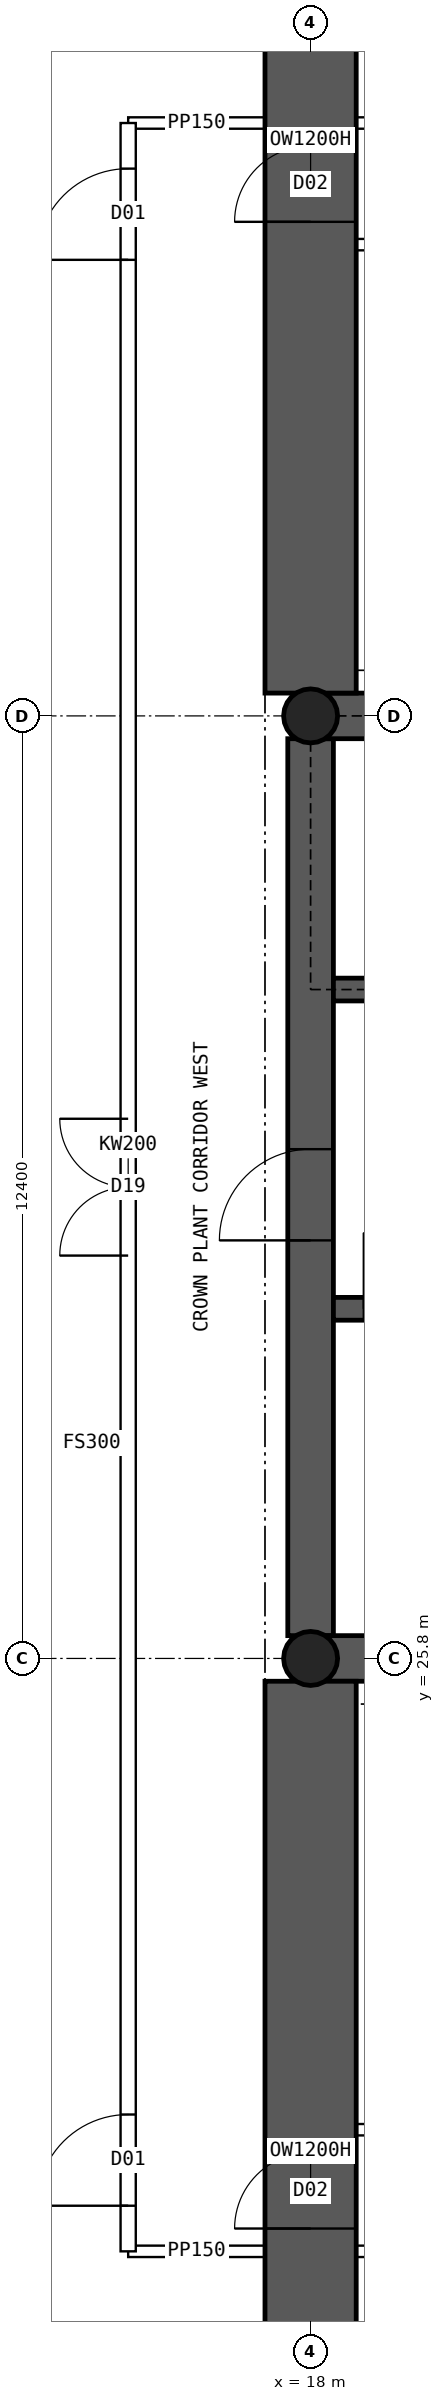
"""IFC4 building model, lengths in metres.
Left out: names, types, materials, properties, quantities, classifications, styles, units other than length and angle.
Written with IfcOpenShell. Run it as: python <this file> out.ifc"""

import sys

from ifc_helpers import new_model, si_unit, direction, frame, frame_2d, origin, origin_2d, place, context, subcontext, project, spatial, rectangle, hollow_circle, extrude, element, fill, save


model = new_model("IFC4")
c1 = context("Model", 3, precision=1e-05, world=origin(), true_north=direction((0.0, 1.0)))
c2 = subcontext(c1, "Body", "Model", "MODEL_VIEW")
j1 = project(units=[si_unit("LENGTHUNIT", "METRE"), si_unit("PLANEANGLEUNIT", "RADIAN")], contexts=[c1])
p1 = place(None, origin())
s1 = spatial("IfcSite", under=j1, at=p1, CompositionType="ELEMENT")
p2 = place(p1, origin())
s2 = spatial("IfcBuilding", under=s1, at=p2, CompositionType="ELEMENT")
p3 = place(p2, frame((0.0, 0.0, 262.3)))
s3 = spatial("IfcBuildingStorey", under=s2, at=p3, CompositionType="ELEMENT", Elevation=262.3)
for number, where, z_axis, x_axis in (
    (1, (18.0, 25.8, 0.0), (0.0, 0.0, 1.0), (1.0, 0.0, 0.0)),
    (2, (18.0, 38.2, 0.0), (0.0, 0.0, 1.0), (1.0, 0.0, 0.0)),
):
    element("IfcWall", number, at=place(p3, frame(where, z_axis=z_axis, x_axis=x_axis)), inside=s3, PredefinedType="SHEAR", context=c2, shape_type="SweptSolid", body=[
        extrude(rectangle(XDim=48.0, YDim=0.6, at=frame_2d((24.0, 0.0))), origin(), (0.0, 0.0, 1.0), 6.0),
    ])
p4 = place(p3, frame((18.0, 26.1, 0.0), z_axis=(0.0, 0.0, 1.0), x_axis=(0.0, 1.0, 0.0)))
e3 = element("IfcWall", 3, at=p4, inside=s3, PredefinedType="SHEAR", context=c2, shape_type="SweptSolid", body=[
    extrude(rectangle(XDim=11.8, YDim=0.6, at=frame_2d((5.9, 0.0))), origin(), (0.0, 0.0, 1.0), 6.0),
])
p5 = place(p4, frame((5.2, 0.0, 0.0)))
e4 = element("IfcOpeningElement", 4, at=p5, cuts=e3, PredefinedType="OPENING", context=c2, shape_type="SweptSolid", body=[
    extrude(rectangle(XDim=1.2, YDim=2.1, at=frame_2d((0.6, 1.05))), frame((0.0, 0.31, 0.0), z_axis=(0.0, -1.0, 0.0), x_axis=(1.0, 0.0, 0.0)), (0.0, 0.0, 1.0), 0.62),
])
p6 = place(p3, frame((18.3, 30.4, 0.0), z_axis=(0.0, 0.0, 1.0), x_axis=(1.0, 0.0, 0.0)))
e5 = element("IfcWall", 5, at=p6, inside=s3, PredefinedType="SHEAR", context=c2, shape_type="SweptSolid", body=[
    extrude(rectangle(XDim=47.4, YDim=0.3, at=frame_2d((23.7, 0.0))), origin(), (0.0, 0.0, 1.0), 6.0),
])
p7 = place(p6, frame((0.4, 0.0, 0.0)))
e6 = element("IfcOpeningElement", 6, at=p7, cuts=e5, PredefinedType="OPENING", context=c2, shape_type="SweptSolid", body=[
    extrude(rectangle(XDim=1.0, YDim=2.1, at=frame_2d((0.5, 1.05))), frame((0.0, 0.16, 0.0), z_axis=(0.0, -1.0, 0.0), x_axis=(1.0, 0.0, 0.0)), (0.0, 0.0, 1.0), 0.32),
])
p8 = place(p6, frame((46.0, 0.0, 0.0)))
e7 = element("IfcOpeningElement", 7, at=p8, cuts=e5, PredefinedType="OPENING", context=c2, shape_type="SweptSolid", body=[
    extrude(rectangle(XDim=1.0, YDim=2.1, at=frame_2d((0.5, 1.05))), frame((0.0, 0.16, 0.0), z_axis=(0.0, -1.0, 0.0), x_axis=(1.0, 0.0, 0.0)), (0.0, 0.0, 1.0), 0.32),
])
p9 = place(p6, frame((19.025, 0.0, 0.0)))
e8 = element("IfcOpeningElement", 8, at=p9, cuts=e5, PredefinedType="OPENING", context=c2, shape_type="SweptSolid", body=[
    extrude(rectangle(XDim=0.9, YDim=2.1, at=frame_2d((0.45, 1.05))), frame((0.0, 0.16, 0.0), z_axis=(0.0, -1.0, 0.0), x_axis=(1.0, 0.0, 0.0)), (0.0, 0.0, 1.0), 0.32),
])
p10 = place(p6, frame((24.525, 0.0, 0.0)))
e9 = element("IfcOpeningElement", 9, at=p10, cuts=e5, PredefinedType="OPENING", context=c2, shape_type="SweptSolid", body=[
    extrude(rectangle(XDim=0.9, YDim=2.1, at=frame_2d((0.45, 1.05))), frame((0.0, 0.16, 0.0), z_axis=(0.0, -1.0, 0.0), x_axis=(1.0, 0.0, 0.0)), (0.0, 0.0, 1.0), 0.32),
])
p11 = place(p6, frame((30.317, 0.0, 0.0)))
e10 = element("IfcOpeningElement", 10, at=p11, cuts=e5, PredefinedType="OPENING", context=c2, shape_type="SweptSolid", body=[
    extrude(rectangle(XDim=1.1, YDim=2.1, at=frame_2d((0.55, 1.05))), frame((0.0, 0.16, 0.0), z_axis=(0.0, -1.0, 0.0), x_axis=(1.0, 0.0, 0.0)), (0.0, 0.0, 1.0), 0.32),
])
p12 = place(p6, frame((33.85, 0.0, 0.0)))
e11 = element("IfcOpeningElement", 11, at=p12, cuts=e5, PredefinedType="OPENING", context=c2, shape_type="SweptSolid", body=[
    extrude(rectangle(XDim=1.1, YDim=2.1, at=frame_2d((0.55, 1.05))), frame((0.0, 0.16, 0.0), z_axis=(0.0, -1.0, 0.0), x_axis=(1.0, 0.0, 0.0)), (0.0, 0.0, 1.0), 0.32),
])
p13 = place(p6, frame((37.383, 0.0, 0.0)))
e12 = element("IfcOpeningElement", 12, at=p13, cuts=e5, PredefinedType="OPENING", context=c2, shape_type="SweptSolid", body=[
    extrude(rectangle(XDim=1.1, YDim=2.1, at=frame_2d((0.55, 1.05))), frame((0.0, 0.16, 0.0), z_axis=(0.0, -1.0, 0.0), x_axis=(1.0, 0.0, 0.0)), (0.0, 0.0, 1.0), 0.32),
])
p14 = place(p3, frame((18.3, 34.6, 0.0), z_axis=(0.0, 0.0, 1.0), x_axis=(1.0, 0.0, 0.0)))
e13 = element("IfcWall", 13, at=p14, inside=s3, PredefinedType="SHEAR", context=c2, shape_type="SweptSolid", body=[
    extrude(rectangle(XDim=47.4, YDim=0.3, at=frame_2d((23.7, 0.0))), origin(), (0.0, 0.0, 1.0), 6.0),
])
p15 = place(p14, frame((0.9, 0.0, 0.0)))
e14 = element("IfcOpeningElement", 14, at=p15, cuts=e13, PredefinedType="OPENING", context=c2, shape_type="SweptSolid", body=[
    extrude(rectangle(XDim=1.1, YDim=2.1, at=frame_2d((0.55, 1.05))), frame((0.0, 0.16, 0.0), z_axis=(0.0, -1.0, 0.0), x_axis=(1.0, 0.0, 0.0)), (0.0, 0.0, 1.0), 0.32),
])
p16 = place(p14, frame((45.4, 0.0, 0.0)))
e15 = element("IfcOpeningElement", 15, at=p16, cuts=e13, PredefinedType="OPENING", context=c2, shape_type="SweptSolid", body=[
    extrude(rectangle(XDim=1.1, YDim=2.1, at=frame_2d((0.55, 1.05))), frame((0.0, 0.16, 0.0), z_axis=(0.0, -1.0, 0.0), x_axis=(1.0, 0.0, 0.0)), (0.0, 0.0, 1.0), 0.32),
])
p17 = place(p14, frame((4.3, 0.0, 0.0)))
e16 = element("IfcOpeningElement", 16, at=p17, cuts=e13, PredefinedType="OPENING", context=c2, shape_type="SweptSolid", body=[
    extrude(rectangle(XDim=0.9, YDim=2.1, at=frame_2d((0.45, 1.05))), frame((0.0, 0.16, 0.0), z_axis=(0.0, -1.0, 0.0), x_axis=(1.0, 0.0, 0.0)), (0.0, 0.0, 1.0), 0.32),
])
p18 = place(p14, frame((42.2, 0.0, 0.0)))
e17 = element("IfcOpeningElement", 17, at=p18, cuts=e13, PredefinedType="OPENING", context=c2, shape_type="SweptSolid", body=[
    extrude(rectangle(XDim=0.9, YDim=2.1, at=frame_2d((0.45, 1.05))), frame((0.0, 0.16, 0.0), z_axis=(0.0, -1.0, 0.0), x_axis=(1.0, 0.0, 0.0)), (0.0, 0.0, 1.0), 0.32),
])
p19 = place(p14, frame((9.075, 0.0, 0.0)))
e18 = element("IfcOpeningElement", 18, at=p19, cuts=e13, PredefinedType="OPENING", context=c2, shape_type="SweptSolid", body=[
    extrude(rectangle(XDim=0.9, YDim=2.1, at=frame_2d((0.45, 1.05))), frame((0.0, 0.16, 0.0), z_axis=(0.0, -1.0, 0.0), x_axis=(1.0, 0.0, 0.0)), (0.0, 0.0, 1.0), 0.32),
])
p20 = place(p14, frame((13.049, 0.0, 0.0)))
e19 = element("IfcOpeningElement", 19, at=p20, cuts=e13, PredefinedType="OPENING", context=c2, shape_type="SweptSolid", body=[
    extrude(rectangle(XDim=0.9, YDim=2.1, at=frame_2d((0.45, 1.05))), frame((0.0, 0.16, 0.0), z_axis=(0.0, -1.0, 0.0), x_axis=(1.0, 0.0, 0.0)), (0.0, 0.0, 1.0), 0.32),
])
p21 = place(p14, frame((16.696, 0.0, 0.0)))
e20 = element("IfcOpeningElement", 20, at=p21, cuts=e13, PredefinedType="OPENING", context=c2, shape_type="SweptSolid", body=[
    extrude(rectangle(XDim=0.9, YDim=2.1, at=frame_2d((0.45, 1.05))), frame((0.0, 0.16, 0.0), z_axis=(0.0, -1.0, 0.0), x_axis=(1.0, 0.0, 0.0)), (0.0, 0.0, 1.0), 0.32),
])
p22 = place(p14, frame((20.455, 0.0, 0.0)))
e21 = element("IfcOpeningElement", 21, at=p22, cuts=e13, PredefinedType="OPENING", context=c2, shape_type="SweptSolid", body=[
    extrude(rectangle(XDim=0.9, YDim=2.1, at=frame_2d((0.45, 1.05))), frame((0.0, 0.16, 0.0), z_axis=(0.0, -1.0, 0.0), x_axis=(1.0, 0.0, 0.0)), (0.0, 0.0, 1.0), 0.32),
])
p23 = place(p14, frame((24.861, 0.0, 0.0)))
e22 = element("IfcOpeningElement", 22, at=p23, cuts=e13, PredefinedType="OPENING", context=c2, shape_type="SweptSolid", body=[
    extrude(rectangle(XDim=0.9, YDim=2.1, at=frame_2d((0.45, 1.05))), frame((0.0, 0.16, 0.0), z_axis=(0.0, -1.0, 0.0), x_axis=(1.0, 0.0, 0.0)), (0.0, 0.0, 1.0), 0.32),
])
p24 = place(p14, frame((27.658, 0.0, 0.0)))
e23 = element("IfcOpeningElement", 23, at=p24, cuts=e13, PredefinedType="OPENING", context=c2, shape_type="SweptSolid", body=[
    extrude(rectangle(XDim=0.9, YDim=2.1, at=frame_2d((0.45, 1.05))), frame((0.0, 0.16, 0.0), z_axis=(0.0, -1.0, 0.0), x_axis=(1.0, 0.0, 0.0)), (0.0, 0.0, 1.0), 0.32),
])
p25 = place(p14, frame((30.031, 0.0, 0.0)))
e24 = element("IfcOpeningElement", 24, at=p25, cuts=e13, PredefinedType="OPENING", context=c2, shape_type="SweptSolid", body=[
    extrude(rectangle(XDim=0.9, YDim=2.1, at=frame_2d((0.45, 1.05))), frame((0.0, 0.16, 0.0), z_axis=(0.0, -1.0, 0.0), x_axis=(1.0, 0.0, 0.0)), (0.0, 0.0, 1.0), 0.32),
])
p26 = place(p14, frame((33.881, 0.0, 0.0)))
e25 = element("IfcOpeningElement", 25, at=p26, cuts=e13, PredefinedType="OPENING", context=c2, shape_type="SweptSolid", body=[
    extrude(rectangle(XDim=0.9, YDim=2.1, at=frame_2d((0.45, 1.05))), frame((0.0, 0.16, 0.0), z_axis=(0.0, -1.0, 0.0), x_axis=(1.0, 0.0, 0.0)), (0.0, 0.0, 1.0), 0.32),
])
p27 = place(p14, frame((37.629, 0.0, 0.0)))
e26 = element("IfcOpeningElement", 26, at=p27, cuts=e13, PredefinedType="OPENING", context=c2, shape_type="SweptSolid", body=[
    extrude(rectangle(XDim=0.9, YDim=2.1, at=frame_2d((0.45, 1.05))), frame((0.0, 0.16, 0.0), z_axis=(0.0, -1.0, 0.0), x_axis=(1.0, 0.0, 0.0)), (0.0, 0.0, 1.0), 0.32),
])
p28 = place(p3, frame((18.0, 12.05, 0.0), z_axis=(0.0, 0.0, 1.0), x_axis=(0.0, 1.0, 0.0)))
e27 = element("IfcWall", 27, at=p28, inside=s3, PredefinedType="SHEAR", context=c2, shape_type="SweptSolid", body=[
    extrude(rectangle(XDim=13.45, YDim=1.2, at=frame_2d((6.725, 0.0))), origin(), (0.0, 0.0, 1.0), 4.4),
])
p29 = place(p28, frame((6.25, 0.0, 0.0)))
e28 = element("IfcOpeningElement", 28, at=p29, cuts=e27, PredefinedType="OPENING", context=c2, shape_type="SweptSolid", body=[
    extrude(rectangle(XDim=1.0, YDim=2.1, at=frame_2d((0.5, 1.05))), frame((0.0, 0.61, 0.0), z_axis=(0.0, -1.0, 0.0), x_axis=(1.0, 0.0, 0.0)), (0.0, 0.0, 1.0), 1.22),
])
p30 = place(p3, frame((18.0, 38.5, 0.0), z_axis=(0.0, 0.0, 1.0), x_axis=(0.0, 1.0, 0.0)))
e29 = element("IfcWall", 29, at=p30, inside=s3, PredefinedType="SHEAR", context=c2, shape_type="SweptSolid", body=[
    extrude(rectangle(XDim=13.45, YDim=1.2, at=frame_2d((6.725, 0.0))), origin(), (0.0, 0.0, 1.0), 4.4),
])
p31 = place(p30, frame((6.2, 0.0, 0.0)))
e30 = element("IfcOpeningElement", 30, at=p31, cuts=e29, PredefinedType="OPENING", context=c2, shape_type="SweptSolid", body=[
    extrude(rectangle(XDim=1.0, YDim=2.1, at=frame_2d((0.5, 1.05))), frame((0.0, 0.61, 0.0), z_axis=(0.0, -1.0, 0.0), x_axis=(1.0, 0.0, 0.0)), (0.0, 0.0, 1.0), 1.22),
])
p32 = place(p3, frame((18.0, 25.8, 0.0), z_axis=(0.0, 0.0, 1.0), x_axis=(1.0, 0.0, 0.0)))
e31 = element("IfcColumn", 31, at=p32, inside=s3, PredefinedType="COLUMN", context=c2, shape_type="SweptSolid", body=[
    extrude(hollow_circle(Radius=0.355, WallThickness=0.025, at=origin_2d()), origin(), (0.0, 0.0, 1.0), 8.426),
])
p33 = place(p3, frame((18.0, 38.2, 0.0), z_axis=(0.0, 0.0, 1.0), x_axis=(1.0, 0.0, 0.0)))
e32 = element("IfcColumn", 32, at=p33, inside=s3, PredefinedType="COLUMN", context=c2, shape_type="SweptSolid", body=[
    extrude(hollow_circle(Radius=0.355, WallThickness=0.025, at=origin_2d()), origin(), (0.0, 0.0, 1.0), 11.517),
])
p34 = place(p3, frame((15.6, 18.0, 0.0), z_axis=(0.0, 0.0, 1.0), x_axis=(0.0, 1.0, 0.0)))
e33 = element("IfcWall", 33, at=p34, inside=s3, PredefinedType="SOLIDWALL", context=c2, shape_type="SweptSolid", body=[
    extrude(rectangle(XDim=28.0, YDim=0.2, at=frame_2d((14.0, 0.0))), origin(), (0.0, 0.0, 1.0), 6.0),
])
p35 = place(p34, frame((13.1, 0.0, 0.0)))
e34 = element("IfcOpeningElement", 34, at=p35, cuts=e33, PredefinedType="OPENING", context=c2, shape_type="SweptSolid", body=[
    extrude(rectangle(XDim=1.8, YDim=2.1, at=frame_2d((0.9, 1.05))), frame((0.0, 0.11, 0.0), z_axis=(0.0, -1.0, 0.0), x_axis=(1.0, 0.0, 0.0)), (0.0, 0.0, 1.0), 0.22),
])
p36 = place(p34, frame((0.6, 0.0, 0.0)))
e35 = element("IfcOpeningElement", 35, at=p36, cuts=e33, PredefinedType="OPENING", context=c2, shape_type="SweptSolid", body=[
    extrude(rectangle(XDim=1.2, YDim=2.1, at=frame_2d((0.6, 1.05))), frame((0.0, 0.11, 0.0), z_axis=(0.0, -1.0, 0.0), x_axis=(1.0, 0.0, 0.0)), (0.0, 0.0, 1.0), 0.22),
])
p37 = place(p34, frame((26.2, 0.0, 0.0)))
e36 = element("IfcOpeningElement", 36, at=p37, cuts=e33, PredefinedType="OPENING", context=c2, shape_type="SweptSolid", body=[
    extrude(rectangle(XDim=1.2, YDim=2.1, at=frame_2d((0.6, 1.05))), frame((0.0, 0.11, 0.0), z_axis=(0.0, -1.0, 0.0), x_axis=(1.0, 0.0, 0.0)), (0.0, 0.0, 1.0), 0.22),
])
p38 = place(p3, frame((15.6, 18.0, 0.0), z_axis=(0.0, 0.0, 1.0), x_axis=(1.0, 0.0, 0.0)))
e37 = element("IfcWall", 37, at=p38, inside=s3, PredefinedType="PARTITIONING", context=c2, shape_type="SweptSolid", body=[
    extrude(rectangle(XDim=1.8, YDim=0.15, at=frame_2d((0.9, 0.0))), origin(), (0.0, 0.0, 1.0), 6.0),
])
p39 = place(p3, frame((18.6, 18.0, 0.0), z_axis=(0.0, 0.0, 1.0), x_axis=(1.0, 0.0, 0.0)))
e38 = element("IfcWall", 38, at=p39, inside=s3, PredefinedType="PARTITIONING", context=c2, shape_type="SweptSolid", body=[
    extrude(rectangle(XDim=4.8, YDim=0.15, at=frame_2d((2.4, 0.0))), origin(), (0.0, 0.0, 1.0), 6.0),
])
p40 = place(p39, frame((0.4, 0.0, 0.0)))
e39 = element("IfcOpeningElement", 39, at=p40, cuts=e38, PredefinedType="OPENING", context=c2, shape_type="SweptSolid", body=[
    extrude(rectangle(XDim=1.8, YDim=2.4, at=frame_2d((0.9, 1.2))), frame((0.0, 0.085, 0.0), z_axis=(0.0, -1.0, 0.0), x_axis=(1.0, 0.0, 0.0)), (0.0, 0.0, 1.0), 0.17),
])
p41 = place(p3, frame((18.6, 19.6, 0.0), z_axis=(0.0, 0.0, 1.0), x_axis=(1.0, 0.0, 0.0)))
e40 = element("IfcWall", 40, at=p41, inside=s3, PredefinedType="PARTITIONING", context=c2, shape_type="SweptSolid", body=[
    extrude(rectangle(XDim=4.8, YDim=0.15, at=frame_2d((2.4, 0.0))), origin(), (0.0, 0.0, 1.0), 6.0),
])
p42 = place(p41, frame((2.6, 0.0, 0.0)))
e41 = element("IfcOpeningElement", 41, at=p42, cuts=e40, PredefinedType="OPENING", context=c2, shape_type="SweptSolid", body=[
    extrude(rectangle(XDim=1.8, YDim=2.4, at=frame_2d((0.9, 1.2))), frame((0.0, 0.085, 0.0), z_axis=(0.0, -1.0, 0.0), x_axis=(1.0, 0.0, 0.0)), (0.0, 0.0, 1.0), 0.17),
])
p43 = place(p3, frame((15.6, 46.0, 0.0), z_axis=(0.0, 0.0, 1.0), x_axis=(1.0, 0.0, 0.0)))
e42 = element("IfcWall", 42, at=p43, inside=s3, PredefinedType="PARTITIONING", context=c2, shape_type="SweptSolid", body=[
    extrude(rectangle(XDim=1.8, YDim=0.15, at=frame_2d((0.9, 0.0))), origin(), (0.0, 0.0, 1.0), 6.0),
])
p44 = place(p3, frame((18.6, 46.0, 0.0), z_axis=(0.0, 0.0, 1.0), x_axis=(1.0, 0.0, 0.0)))
e43 = element("IfcWall", 43, at=p44, inside=s3, PredefinedType="PARTITIONING", context=c2, shape_type="SweptSolid", body=[
    extrude(rectangle(XDim=4.8, YDim=0.15, at=frame_2d((2.4, 0.0))), origin(), (0.0, 0.0, 1.0), 6.0),
])
p45 = place(p44, frame((0.4, 0.0, 0.0)))
e44 = element("IfcOpeningElement", 44, at=p45, cuts=e43, PredefinedType="OPENING", context=c2, shape_type="SweptSolid", body=[
    extrude(rectangle(XDim=1.8, YDim=2.4, at=frame_2d((0.9, 1.2))), frame((0.0, 0.085, 0.0), z_axis=(0.0, -1.0, 0.0), x_axis=(1.0, 0.0, 0.0)), (0.0, 0.0, 1.0), 0.17),
])
p46 = place(p3, frame((18.6, 44.4, 0.0), z_axis=(0.0, 0.0, 1.0), x_axis=(1.0, 0.0, 0.0)))
e45 = element("IfcWall", 45, at=p46, inside=s3, PredefinedType="PARTITIONING", context=c2, shape_type="SweptSolid", body=[
    extrude(rectangle(XDim=4.8, YDim=0.15, at=frame_2d((2.4, 0.0))), origin(), (0.0, 0.0, 1.0), 6.0),
])
p47 = place(p46, frame((2.6, 0.0, 0.0)))
e46 = element("IfcOpeningElement", 46, at=p47, cuts=e45, PredefinedType="OPENING", context=c2, shape_type="SweptSolid", body=[
    extrude(rectangle(XDim=1.8, YDim=2.4, at=frame_2d((0.9, 1.2))), frame((0.0, 0.085, 0.0), z_axis=(0.0, -1.0, 0.0), x_axis=(1.0, 0.0, 0.0)), (0.0, 0.0, 1.0), 0.17),
])
p48 = place(p5, origin())
e47 = element("IfcDoor", 47, at=p48, inside=s3, OperationType="SINGLE_SWING_LEFT", PredefinedType="DOOR", context=c2, shape_type="SweptSolid", body=[
    extrude(rectangle(XDim=1.2, YDim=2.1, at=frame_2d((0.6, 1.05))), frame((0.0, 0.025, 0.0), z_axis=(0.0, -1.0, 0.0), x_axis=(1.0, 0.0, 0.0)), (0.0, 0.0, 1.0), 0.05),
])
fill(e4, e47)
p49 = place(p35, origin())
e48 = element("IfcDoor", 48, at=p49, inside=s3, OperationType="DOUBLE_DOOR_SINGLE_SWING", PredefinedType="DOOR", context=c2, shape_type="SweptSolid", body=[
    extrude(rectangle(XDim=1.8, YDim=2.1, at=frame_2d((0.9, 1.05))), frame((0.0, 0.025, 0.0), z_axis=(0.0, -1.0, 0.0), x_axis=(1.0, 0.0, 0.0)), (0.0, 0.0, 1.0), 0.05),
])
fill(e34, e48)
p50 = place(p36, origin())
e49 = element("IfcDoor", 49, at=p50, inside=s3, OperationType="SINGLE_SWING_LEFT", PredefinedType="DOOR", context=c2, shape_type="SweptSolid", body=[
    extrude(rectangle(XDim=1.2, YDim=2.1, at=frame_2d((0.6, 1.05))), frame((0.0, 0.025, 0.0), z_axis=(0.0, -1.0, 0.0), x_axis=(1.0, 0.0, 0.0)), (0.0, 0.0, 1.0), 0.05),
])
fill(e35, e49)
p51 = place(p37, origin())
e50 = element("IfcDoor", 50, at=p51, inside=s3, OperationType="SINGLE_SWING_LEFT", PredefinedType="DOOR", context=c2, shape_type="SweptSolid", body=[
    extrude(rectangle(XDim=1.2, YDim=2.1, at=frame_2d((0.6, 1.05))), frame((0.0, 0.025, 0.0), z_axis=(0.0, -1.0, 0.0), x_axis=(1.0, 0.0, 0.0)), (0.0, 0.0, 1.0), 0.05),
])
fill(e36, e50)
p52 = place(p29, origin())
e51 = element("IfcDoor", 51, at=p52, inside=s3, OperationType="SINGLE_SWING_LEFT", PredefinedType="DOOR", context=c2, shape_type="SweptSolid", body=[
    extrude(rectangle(XDim=1.0, YDim=2.1, at=frame_2d((0.5, 1.05))), frame((0.0, 0.025, 0.0), z_axis=(0.0, -1.0, 0.0), x_axis=(1.0, 0.0, 0.0)), (0.0, 0.0, 1.0), 0.05),
])
fill(e28, e51)
p53 = place(p31, origin())
e52 = element("IfcDoor", 52, at=p53, inside=s3, OperationType="SINGLE_SWING_LEFT", PredefinedType="DOOR", context=c2, shape_type="SweptSolid", body=[
    extrude(rectangle(XDim=1.0, YDim=2.1, at=frame_2d((0.5, 1.05))), frame((0.0, 0.025, 0.0), z_axis=(0.0, -1.0, 0.0), x_axis=(1.0, 0.0, 0.0)), (0.0, 0.0, 1.0), 0.05),
])
fill(e30, e52)
save(model, sys.argv[1])
